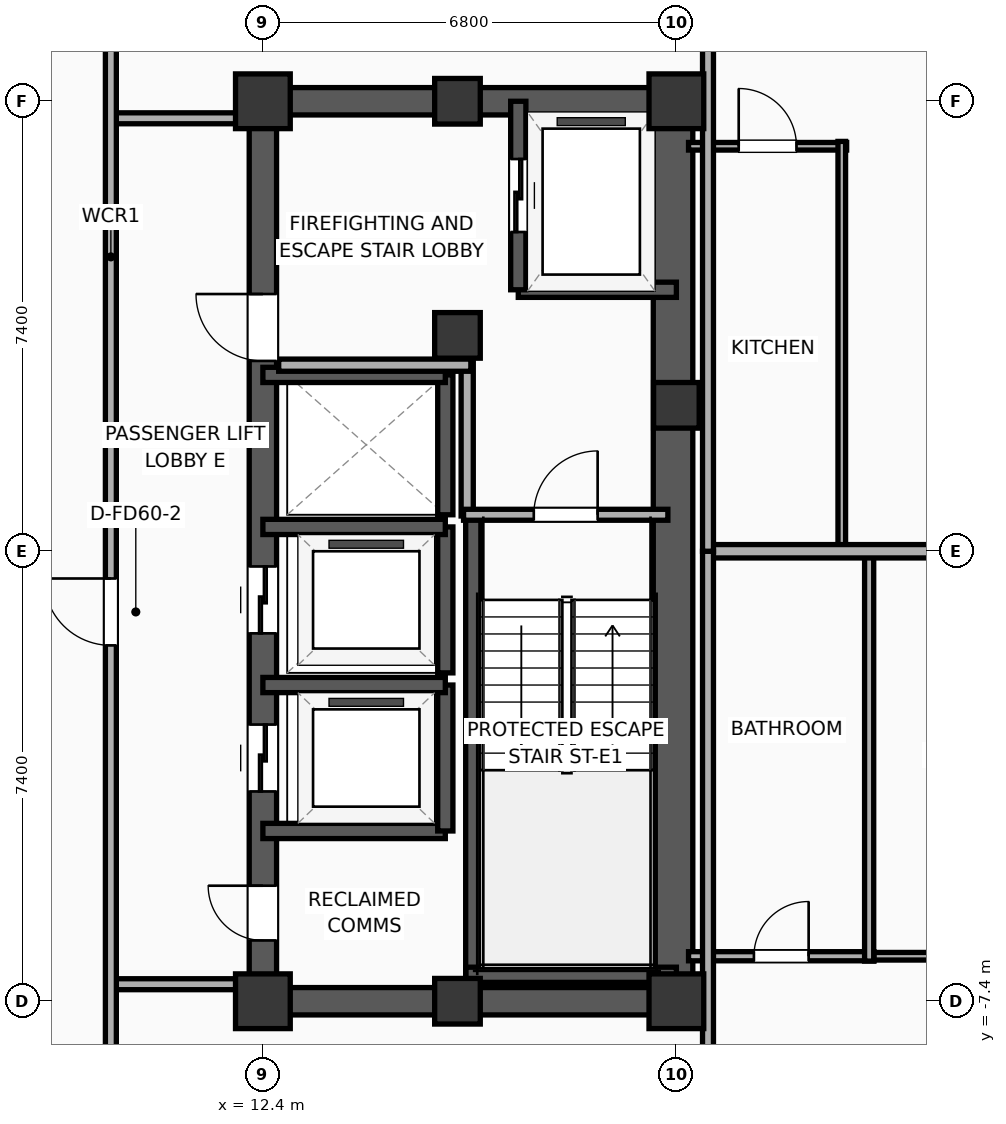
"""IFC4 building model, lengths in metres.
Left out: names, types, materials, properties, quantities, classifications, styles, units other than length and angle.
Written with IfcOpenShell. Run it as: python <this file> out.ifc"""

import sys

from ifc_helpers import new_model, si_unit, direction, frame, frame_2d, origin, origin_2d, place, context, subcontext, project, spatial, rectangle, extrude, element, fill, save


model = new_model("IFC4")
c1 = context("Model", 3, precision=1e-05, world=origin(), true_north=direction((0.0, 1.0)))
c2 = subcontext(c1, "Body", "Model", "MODEL_VIEW")
j1 = project(units=[si_unit("LENGTHUNIT", "METRE"), si_unit("PLANEANGLEUNIT", "RADIAN")], contexts=[c1])
p1 = place(None, origin())
s1 = spatial("IfcSite", under=j1, at=p1, CompositionType="ELEMENT")
p2 = place(p1, origin())
s2 = spatial("IfcBuilding", under=s1, at=p2, CompositionType="ELEMENT")
p3 = place(p2, frame((0.0, 0.0, 152.1)))
s3 = spatial("IfcBuildingStorey", under=s2, at=p3, CompositionType="ELEMENT", Elevation=152.1)
p4 = place(p3, frame((12.4, -7.4, 0.0), z_axis=(0.0, 0.0, 1.0), x_axis=(1.0, 0.0, 0.0)))
e1 = element("IfcColumn", 1, at=p4, inside=s3, PredefinedType="COLUMN", context=c2, shape_type="SweptSolid", body=[
    extrude(rectangle(XDim=0.9, YDim=0.9, at=origin_2d()), origin(), (0.0, 0.0, 1.0), 3.9),
])
p5 = place(p3, frame((15.6, 3.55, 0.0), z_axis=(0.0, 0.0, 1.0), x_axis=(1.0, 0.0, 0.0)))
e2 = element("IfcColumn", 2, at=p5, inside=s3, PredefinedType="COLUMN", context=c2, shape_type="SweptSolid", body=[
    extrude(rectangle(XDim=0.75, YDim=0.75, at=origin_2d()), origin(), (0.0, 0.0, 1.0), 3.9),
])
p6 = place(p3, frame((12.4, 7.4, 0.0), z_axis=(0.0, 0.0, 1.0), x_axis=(1.0, 0.0, 0.0)))
e3 = element("IfcColumn", 3, at=p6, inside=s3, PredefinedType="COLUMN", context=c2, shape_type="SweptSolid", body=[
    extrude(rectangle(XDim=0.9, YDim=0.9, at=origin_2d()), origin(), (0.0, 0.0, 1.0), 3.9),
])
for number, where, z_axis, x_axis in (
    (4, (15.6, -7.4, 0.0), (0.0, 0.0, 1.0), (1.0, 0.0, 0.0)),
    (5, (15.6, 7.4, 0.0), (0.0, 0.0, 1.0), (1.0, 0.0, 0.0)),
):
    element("IfcColumn", number, at=place(p3, frame(where, z_axis=z_axis, x_axis=x_axis)), inside=s3, PredefinedType="COLUMN", context=c2, shape_type="SweptSolid", body=[
        extrude(rectangle(XDim=0.75, YDim=0.75, at=origin_2d()), origin(), (0.0, 0.0, 1.0), 3.9),
    ])
p7 = place(p3, frame((19.2, -7.4, 0.0), z_axis=(0.0, 0.0, 1.0), x_axis=(1.0, 0.0, 0.0)))
e6 = element("IfcColumn", 6, at=p7, inside=s3, PredefinedType="COLUMN", context=c2, shape_type="SweptSolid", body=[
    extrude(rectangle(XDim=0.9, YDim=0.9, at=origin_2d()), origin(), (0.0, 0.0, 1.0), 3.9),
])
p8 = place(p3, frame((19.2, 2.4, 0.0), z_axis=(0.0, 0.0, 1.0), x_axis=(1.0, 0.0, 0.0)))
e7 = element("IfcColumn", 7, at=p8, inside=s3, PredefinedType="COLUMN", context=c2, shape_type="SweptSolid", body=[
    extrude(rectangle(XDim=0.75, YDim=0.75, at=origin_2d()), origin(), (0.0, 0.0, 1.0), 3.9),
])
p9 = place(p3, frame((19.2, 7.4, 0.0), z_axis=(0.0, 0.0, 1.0), x_axis=(1.0, 0.0, 0.0)))
e8 = element("IfcColumn", 8, at=p9, inside=s3, PredefinedType="COLUMN", context=c2, shape_type="SweptSolid", body=[
    extrude(rectangle(XDim=0.9, YDim=0.9, at=origin_2d()), origin(), (0.0, 0.0, 1.0), 3.9),
])
for number, where, z_axis, x_axis in (
    (9, (12.175, -7.4, 0.0), (0.0, 0.0, 1.0), (1.0, 0.0, 0.0)),
    (10, (12.175, 7.4, 0.0), (0.0, 0.0, 1.0), (1.0, 0.0, 0.0)),
):
    element("IfcWall", number, at=place(p3, frame(where, z_axis=z_axis, x_axis=x_axis)), inside=s3, PredefinedType="SHEAR", context=c2, shape_type="SweptSolid", body=[
        extrude(rectangle(XDim=7.25, YDim=0.45, at=frame_2d((3.625, 0.0))), origin(), (0.0, 0.0, 1.0), 3.65),
    ])
p10 = place(p3, frame((12.4, -7.4, 0.0), z_axis=(0.0, 0.0, 1.0), x_axis=(0.0, 1.0, 0.0)))
e11 = element("IfcWall", 11, at=p10, inside=s3, PredefinedType="SHEAR", context=c2, shape_type="SweptSolid", body=[
    extrude(rectangle(XDim=14.8, YDim=0.45, at=frame_2d((7.4, 0.0))), origin(), (0.0, 0.0, 1.0), 3.65),
])
p11 = place(p10, frame((3.45, 0.0, 0.0)))
e12 = element("IfcOpeningElement", 12, at=p11, cuts=e11, PredefinedType="OPENING", context=c2, shape_type="SweptSolid", body=[
    extrude(rectangle(XDim=1.1, YDim=2.05, at=frame_2d((0.55, 1.025))), frame((0.0, 0.235, 0.0), z_axis=(0.0, -1.0, 0.0), x_axis=(1.0, 0.0, 0.0)), (0.0, 0.0, 1.0), 0.47),
])
p12 = place(p10, frame((6.05, 0.0, 0.0)))
e13 = element("IfcOpeningElement", 13, at=p12, cuts=e11, PredefinedType="OPENING", context=c2, shape_type="SweptSolid", body=[
    extrude(rectangle(XDim=1.1, YDim=2.05, at=frame_2d((0.55, 1.025))), frame((0.0, 0.235, 0.0), z_axis=(0.0, -1.0, 0.0), x_axis=(1.0, 0.0, 0.0)), (0.0, 0.0, 1.0), 0.47),
])
p13 = place(p10, frame((10.53, 0.0, 0.0)))
e14 = element("IfcOpeningElement", 14, at=p13, cuts=e11, PredefinedType="OPENING", context=c2, shape_type="SweptSolid", body=[
    extrude(rectangle(XDim=1.1, YDim=2.05, at=frame_2d((0.55, 1.025))), frame((0.0, 0.235, 0.0), z_axis=(0.0, -1.0, 0.0), x_axis=(1.0, 0.0, 0.0)), (0.0, 0.0, 1.0), 0.47),
])
p14 = place(p10, frame((1.0, 0.0, 0.0)))
e15 = element("IfcOpeningElement", 15, at=p14, cuts=e11, PredefinedType="OPENING", context=c2, shape_type="SweptSolid", body=[
    extrude(rectangle(XDim=0.9, YDim=2.05, at=frame_2d((0.45, 1.025))), frame((0.0, 0.235, 0.0), z_axis=(0.0, -1.0, 0.0), x_axis=(1.0, 0.0, 0.0)), (0.0, 0.0, 1.0), 0.47),
])
p15 = place(p3, frame((19.145, -7.4, 0.0), z_axis=(0.0, 0.0, 1.0), x_axis=(0.0, 1.0, 0.0)))
e16 = element("IfcWall", 16, at=p15, inside=s3, PredefinedType="SHEAR", context=c2, shape_type="SweptSolid", body=[
    extrude(rectangle(XDim=14.8, YDim=0.65, at=frame_2d((7.4, 0.0))), origin(), (0.0, 0.0, 1.0), 3.65),
])
p16 = place(p3, frame((15.86, -7.085, 0.0), z_axis=(0.0, 0.0, 1.0), x_axis=(0.0, 1.0, 0.0)))
e17 = element("IfcWall", 17, at=p16, inside=s3, PredefinedType="SOLIDWALL", context=c2, shape_type="SweptSolid", body=[
    extrude(rectangle(XDim=7.685, YDim=0.25, at=frame_2d((3.843, 0.0))), origin(), (0.0, 0.0, 1.0), 3.65),
])
p17 = place(p3, frame((15.74, -6.965, 0.0), z_axis=(0.0, 0.0, 1.0), x_axis=(1.0, 0.0, 0.0)))
e18 = element("IfcWall", 18, at=p17, inside=s3, PredefinedType="SOLIDWALL", context=c2, shape_type="SweptSolid", body=[
    extrude(rectangle(XDim=3.46, YDim=0.25, at=frame_2d((1.73, 0.0))), origin(), (0.0, 0.0, 1.0), 3.65),
])
p18 = place(p3, frame((16.6, 4.3, 0.0), z_axis=(0.0, 0.0, 1.0), x_axis=(1.0, 0.0, 0.0)))
e19 = element("IfcWall", 19, at=p18, inside=s3, PredefinedType="SOLIDWALL", context=c2, shape_type="SweptSolid", body=[
    extrude(rectangle(XDim=2.6, YDim=0.25, at=frame_2d((1.3, 0.0))), origin(), (0.0, 0.0, 1.0), 3.65),
])
p19 = place(p3, frame((16.6, 7.4, 0.0), z_axis=(0.0, 0.0, 1.0), x_axis=(0.0, -1.0, 0.0)))
e20 = element("IfcWall", 20, at=p19, inside=s3, PredefinedType="SOLIDWALL", context=c2, shape_type="SweptSolid", body=[
    extrude(rectangle(XDim=3.1, YDim=0.25, at=frame_2d((1.55, 0.0))), origin(), (0.0, 0.0, 1.0), 3.65),
])
p20 = place(p19, frame((0.95, 0.0, 0.0)))
e21 = element("IfcOpeningElement", 21, at=p20, cuts=e20, PredefinedType="OPENING", context=c2, shape_type="SweptSolid", body=[
    extrude(rectangle(XDim=1.2, YDim=2.05, at=frame_2d((0.6, 1.025))), frame((0.0, 0.135, 0.0), z_axis=(0.0, -1.0, 0.0), x_axis=(1.0, 0.0, 0.0)), (0.0, 0.0, 1.0), 0.27),
])
p21 = place(p3, frame((12.4, -4.6, 0.0), z_axis=(0.0, 0.0, 1.0), x_axis=(1.0, 0.0, 0.0)))
e22 = element("IfcWall", 22, at=p21, inside=s3, PredefinedType="SOLIDWALL", context=c2, shape_type="SweptSolid", body=[
    extrude(rectangle(XDim=3.0, YDim=0.25, at=frame_2d((1.5, 0.0))), origin(), (0.0, 0.0, 1.0), 3.65),
])
p22 = place(p3, frame((15.4, -4.6, 0.0), z_axis=(0.0, 0.0, 1.0), x_axis=(0.0, 1.0, 0.0)))
e23 = element("IfcWall", 23, at=p22, inside=s3, PredefinedType="SOLIDWALL", context=c2, shape_type="SweptSolid", body=[
    extrude(rectangle(XDim=2.4, YDim=0.25, at=frame_2d((1.2, 0.0))), origin(), (0.0, 0.0, 1.0), 3.65),
])
p23 = place(p3, frame((15.4, -2.2, 0.0), z_axis=(0.0, 0.0, 1.0), x_axis=(-1.0, 0.0, 0.0)))
e24 = element("IfcWall", 24, at=p23, inside=s3, PredefinedType="SOLIDWALL", context=c2, shape_type="SweptSolid", body=[
    extrude(rectangle(XDim=3.0, YDim=0.25, at=frame_2d((1.5, 0.0))), origin(), (0.0, 0.0, 1.0), 3.65),
])
p24 = place(p3, frame((15.4, -2.0, 0.0), z_axis=(0.0, 0.0, 1.0), x_axis=(0.0, 1.0, 0.0)))
e25 = element("IfcWall", 25, at=p24, inside=s3, PredefinedType="SOLIDWALL", context=c2, shape_type="SweptSolid", body=[
    extrude(rectangle(XDim=2.4, YDim=0.25, at=frame_2d((1.2, 0.0))), origin(), (0.0, 0.0, 1.0), 3.65),
])
p25 = place(p3, frame((15.4, 0.4, 0.0), z_axis=(0.0, 0.0, 1.0), x_axis=(-1.0, 0.0, 0.0)))
e26 = element("IfcWall", 26, at=p25, inside=s3, PredefinedType="SOLIDWALL", context=c2, shape_type="SweptSolid", body=[
    extrude(rectangle(XDim=3.0, YDim=0.25, at=frame_2d((1.5, 0.0))), origin(), (0.0, 0.0, 1.0), 3.65),
])
p26 = place(p3, frame((15.4, 0.6, 0.0), z_axis=(0.0, 0.0, 1.0), x_axis=(0.0, 1.0, 0.0)))
e27 = element("IfcWall", 27, at=p26, inside=s3, PredefinedType="SOLIDWALL", context=c2, shape_type="SweptSolid", body=[
    extrude(rectangle(XDim=2.3, YDim=0.25, at=frame_2d((1.15, 0.0))), origin(), (0.0, 0.0, 1.0), 3.65),
])
p27 = place(p3, frame((15.4, 2.9, 0.0), z_axis=(0.0, 0.0, 1.0), x_axis=(-1.0, 0.0, 0.0)))
e28 = element("IfcWall", 28, at=p27, inside=s3, PredefinedType="SOLIDWALL", context=c2, shape_type="SweptSolid", body=[
    extrude(rectangle(XDim=3.0, YDim=0.25, at=frame_2d((1.5, 0.0))), origin(), (0.0, 0.0, 1.0), 3.65),
])
p28 = place(p3, frame((15.76, 0.58, 0.0), z_axis=(0.0, 0.0, 1.0), x_axis=(0.0, 1.0, 0.0)))
e29 = element("IfcWall", 29, at=p28, inside=s3, PredefinedType="PARTITIONING", context=c2, shape_type="SweptSolid", body=[
    extrude(rectangle(XDim=2.52, YDim=0.2, at=frame_2d((1.26, 0.0))), origin(), (0.0, 0.0, 1.0), 3.65),
])
p29 = place(p3, frame((12.66, 3.06, 0.0), z_axis=(0.0, 0.0, 1.0), x_axis=(1.0, 0.0, 0.0)))
e30 = element("IfcWall", 30, at=p29, inside=s3, PredefinedType="PARTITIONING", context=c2, shape_type="SweptSolid", body=[
    extrude(rectangle(XDim=3.16, YDim=0.2, at=frame_2d((1.58, 0.0))), origin(), (0.0, 0.0, 1.0), 3.65),
])
p30 = place(p3, frame((15.7, 0.6, 0.0), z_axis=(0.0, 0.0, 1.0), x_axis=(1.0, 0.0, 0.0)))
e31 = element("IfcWall", 31, at=p30, inside=s3, PredefinedType="PARTITIONING", context=c2, shape_type="SweptSolid", body=[
    extrude(rectangle(XDim=3.36, YDim=0.18, at=frame_2d((1.68, 0.0))), origin(), (0.0, 0.0, 1.0), 3.65),
])
p31 = place(p30, frame((1.155, 0.0, 0.0)))
e32 = element("IfcOpeningElement", 32, at=p31, cuts=e31, PredefinedType="OPENING", context=c2, shape_type="SweptSolid", body=[
    extrude(rectangle(XDim=1.05, YDim=2.05, at=frame_2d((0.525, 1.025))), frame((0.0, 0.1, 0.0), z_axis=(0.0, -1.0, 0.0), x_axis=(1.0, 0.0, 0.0)), (0.0, 0.0, 1.0), 0.2),
])
for number, where, z_axis, x_axis in (
    (33, (9.88, 7.12, 0.0), (0.0, 0.0, 1.0), (1.0, 0.0, 0.0)),
    (34, (9.88, -7.12, 0.0), (0.0, 0.0, 1.0), (1.0, 0.0, 0.0)),
):
    element("IfcWall", number, at=place(p3, frame(where, z_axis=z_axis, x_axis=x_axis)), inside=s3, PredefinedType="PARTITIONING", context=c2, shape_type="SweptSolid", body=[
        extrude(rectangle(XDim=2.27, YDim=0.18, at=frame_2d((1.135, 0.0))), origin(), (0.0, 0.0, 1.0), 3.65),
    ])
p32 = place(p3, frame((9.9, -9.98, 0.0), z_axis=(0.0, 0.0, 1.0), x_axis=(0.0, 1.0, 0.0)))
e35 = element("IfcWall", 35, at=p32, inside=s3, PredefinedType="PARTITIONING", context=c2, shape_type="SweptSolid", body=[
    extrude(rectangle(XDim=19.96, YDim=0.18, at=frame_2d((9.98, 0.0))), origin(), (0.0, 0.0, 1.0), 3.65),
])
p33 = place(p32, frame((8.432, 0.0, 0.0)))
e36 = element("IfcOpeningElement", 36, at=p33, cuts=e35, PredefinedType="OPENING", context=c2, shape_type="SweptSolid", body=[
    extrude(rectangle(XDim=1.1, YDim=2.05, at=frame_2d((0.55, 1.025))), frame((0.0, 0.1, 0.0), z_axis=(0.0, -1.0, 0.0), x_axis=(1.0, 0.0, 0.0)), (0.0, 0.0, 1.0), 0.2),
])
p34 = place(p3, frame((22.31, -6.66, 0.0), z_axis=(0.0, 0.0, 1.0), x_axis=(1.0, 0.0, 0.0)))
e37 = element("IfcWall", 37, at=p34, inside=s3, PredefinedType="PARTITIONING", context=c2, shape_type="SweptSolid", body=[
    extrude(rectangle(XDim=5.071, YDim=0.125, at=frame_2d((2.536, 0.0))), origin(), (0.0, 0.0, 1.0), 3.65),
])
p35 = place(p34, frame((1.832, 0.0, 0.0)))
e38 = element("IfcOpeningElement", 38, at=p35, cuts=e37, PredefinedType="OPENING", context=c2, shape_type="SweptSolid", body=[
    extrude(rectangle(XDim=0.9, YDim=2.05, at=frame_2d((0.45, 1.025))), frame((0.0, 0.073, 0.0), z_axis=(0.0, -1.0, 0.0), x_axis=(1.0, 0.0, 0.0)), (0.0, 0.0, 1.0), 0.145),
])
p36 = place(p3, frame((19.4, -6.66, 0.0), z_axis=(0.0, 0.0, 1.0), x_axis=(1.0, 0.0, 0.0)))
e39 = element("IfcWall", 39, at=p36, inside=s3, PredefinedType="PLUMBINGWALL", context=c2, shape_type="SweptSolid", body=[
    extrude(rectangle(XDim=3.05, YDim=0.15, at=frame_2d((1.525, 0.0))), origin(), (0.0, 0.0, 1.0), 3.04),
])
p37 = place(p36, frame((1.075, 0.0, 0.0)))
e40 = element("IfcOpeningElement", 40, at=p37, cuts=e39, PredefinedType="OPENING", context=c2, shape_type="SweptSolid", body=[
    extrude(rectangle(XDim=0.9, YDim=2.05, at=frame_2d((0.45, 1.025))), frame((0.0, 0.085, 0.0), z_axis=(0.0, -1.0, 0.0), x_axis=(1.0, 0.0, 0.0)), (0.0, 0.0, 1.0), 0.17),
])
p38 = place(p3, frame((22.37, -6.74, 0.0), z_axis=(0.0, 0.0, 1.0), x_axis=(0.0, 1.0, 0.0)))
e41 = element("IfcWall", 41, at=p38, inside=s3, PredefinedType="PLUMBINGWALL", context=c2, shape_type="SweptSolid", body=[
    extrude(rectangle(XDim=6.72, YDim=0.15, at=frame_2d((3.36, 0.0))), origin(), (0.0, 0.0, 1.0), 3.65),
])
p39 = place(p3, frame((19.4, 6.66, 0.0), z_axis=(0.0, 0.0, 1.0), x_axis=(1.0, 0.0, 0.0)))
e42 = element("IfcWall", 42, at=p39, inside=s3, PredefinedType="PARTITIONING", context=c2, shape_type="SweptSolid", body=[
    extrude(rectangle(XDim=2.6, YDim=0.125, at=frame_2d((1.3, 0.0))), origin(), (0.0, 0.0, 1.0), 3.65),
])
p40 = place(p39, frame((0.825, 0.0, 0.0)))
e43 = element("IfcOpeningElement", 43, at=p40, cuts=e42, PredefinedType="OPENING", context=c2, shape_type="SweptSolid", body=[
    extrude(rectangle(XDim=0.95, YDim=2.05, at=frame_2d((0.475, 1.025))), frame((0.0, 0.073, 0.0), z_axis=(0.0, -1.0, 0.0), x_axis=(1.0, 0.0, 0.0)), (0.0, 0.0, 1.0), 0.145),
])
p41 = place(p3, frame((21.92, 0.02, 0.0), z_axis=(0.0, 0.0, 1.0), x_axis=(0.0, 1.0, 0.0)))
e44 = element("IfcWall", 44, at=p41, inside=s3, PredefinedType="PARTITIONING", context=c2, shape_type="SweptSolid", body=[
    extrude(rectangle(XDim=6.72, YDim=0.125, at=frame_2d((3.36, 0.0))), origin(), (0.0, 0.0, 1.0), 3.65),
])
p42 = place(p3, frame((19.72, 0.0, 0.0), z_axis=(0.0, 0.0, 1.0), x_axis=(1.0, 0.0, 0.0)))
e45 = element("IfcWall", 45, at=p42, inside=s3, PredefinedType="PARTITIONING", context=c2, shape_type="SweptSolid", body=[
    extrude(rectangle(XDim=6.81, YDim=0.22, at=frame_2d((3.405, 0.0))), origin(), (0.0, 0.0, 1.0), 3.65),
])
p43 = place(p3, frame((19.72, -18.532, 0.0), z_axis=(0.0, 0.0, 1.0), x_axis=(0.0, 1.0, 0.0)))
e46 = element("IfcWall", 46, at=p43, inside=s3, PredefinedType="PARTITIONING", context=c2, shape_type="SweptSolid", body=[
    extrude(rectangle(XDim=18.532, YDim=0.18, at=frame_2d((9.266, 0.0))), origin(), (0.0, 0.0, 1.0), 3.65),
])
p44 = place(p43, frame((7.452, 0.0, 0.0)))
e47 = element("IfcOpeningElement", 47, at=p44, cuts=e46, PredefinedType="OPENING", context=c2, shape_type="SweptSolid", body=[
    extrude(rectangle(XDim=0.9, YDim=2.05, at=frame_2d((0.45, 1.025))), frame((0.0, 0.1, 0.0), z_axis=(0.0, -1.0, 0.0), x_axis=(1.0, 0.0, 0.0)), (0.0, 0.0, 1.0), 0.2),
])
p45 = place(p3, frame((19.72, 0.0, 0.0), z_axis=(0.0, 0.0, 1.0), x_axis=(0.0, 1.0, 0.0)))
e48 = element("IfcWall", 48, at=p45, inside=s3, PredefinedType="PARTITIONING", context=c2, shape_type="SweptSolid", body=[
    extrude(rectangle(XDim=22.15, YDim=0.18, at=frame_2d((11.075, 0.0))), origin(), (0.0, 0.0, 1.0), 3.04),
])
p46 = place(p45, frame((10.18, 0.0, 0.0)))
e49 = element("IfcOpeningElement", 49, at=p46, cuts=e48, PredefinedType="OPENING", context=c2, shape_type="SweptSolid", body=[
    extrude(rectangle(XDim=0.9, YDim=2.05, at=frame_2d((0.45, 1.025))), frame((0.0, 0.1, 0.0), z_axis=(0.0, -1.0, 0.0), x_axis=(1.0, 0.0, 0.0)), (0.0, 0.0, 1.0), 0.2),
])
p47 = place(p20, origin())
e50 = element("IfcDoor", 50, at=p47, inside=s3, OperationType="SLIDING_TO_LEFT", PredefinedType="DOOR", context=c2, shape_type="SweptSolid", body=[
    extrude(rectangle(XDim=1.2, YDim=2.05, at=frame_2d((0.6, 1.025))), frame((0.0, 0.025, 0.0), z_axis=(0.0, -1.0, 0.0), x_axis=(1.0, 0.0, 0.0)), (0.0, 0.0, 1.0), 0.05),
])
fill(e21, e50)
p48 = place(p11, origin())
e51 = element("IfcDoor", 51, at=p48, inside=s3, OperationType="SLIDING_TO_LEFT", PredefinedType="DOOR", context=c2, shape_type="SweptSolid", body=[
    extrude(rectangle(XDim=1.1, YDim=2.05, at=frame_2d((0.55, 1.025))), frame((0.0, 0.025, 0.0), z_axis=(0.0, -1.0, 0.0), x_axis=(1.0, 0.0, 0.0)), (0.0, 0.0, 1.0), 0.05),
])
fill(e12, e51)
p49 = place(p12, origin())
e52 = element("IfcDoor", 52, at=p49, inside=s3, OperationType="SLIDING_TO_LEFT", PredefinedType="DOOR", context=c2, shape_type="SweptSolid", body=[
    extrude(rectangle(XDim=1.1, YDim=2.05, at=frame_2d((0.55, 1.025))), frame((0.0, 0.025, 0.0), z_axis=(0.0, -1.0, 0.0), x_axis=(1.0, 0.0, 0.0)), (0.0, 0.0, 1.0), 0.05),
])
fill(e13, e52)
p50 = place(p31, origin())
e53 = element("IfcDoor", 53, at=p50, inside=s3, OperationType="SINGLE_SWING_RIGHT", PredefinedType="DOOR", context=c2, shape_type="SweptSolid", body=[
    extrude(rectangle(XDim=1.05, YDim=2.05, at=frame_2d((0.525, 1.025))), frame((0.0, 0.025, 0.0), z_axis=(0.0, -1.0, 0.0), x_axis=(1.0, 0.0, 0.0)), (0.0, 0.0, 1.0), 0.05),
])
fill(e32, e53)
p51 = place(p33, origin())
e54 = element("IfcDoor", 54, at=p51, inside=s3, OperationType="SINGLE_SWING_RIGHT", PredefinedType="DOOR", context=c2, shape_type="SweptSolid", body=[
    extrude(rectangle(XDim=1.1, YDim=2.05, at=frame_2d((0.55, 1.025))), frame((0.0, 0.025, 0.0), z_axis=(0.0, -1.0, 0.0), x_axis=(1.0, 0.0, 0.0)), (0.0, 0.0, 1.0), 0.05),
])
fill(e36, e54)
p52 = place(p37, origin())
e55 = element("IfcDoor", 55, at=p52, inside=s3, OperationType="SINGLE_SWING_RIGHT", PredefinedType="DOOR", context=c2, shape_type="SweptSolid", body=[
    extrude(rectangle(XDim=0.9, YDim=2.05, at=frame_2d((0.45, 1.025))), frame((0.0, 0.025, 0.0), z_axis=(0.0, -1.0, 0.0), x_axis=(1.0, 0.0, 0.0)), (0.0, 0.0, 1.0), 0.05),
])
fill(e40, e55)
p53 = place(p40, origin())
e56 = element("IfcDoor", 56, at=p53, inside=s3, OperationType="SINGLE_SWING_LEFT", PredefinedType="DOOR", context=c2, shape_type="SweptSolid", body=[
    extrude(rectangle(XDim=0.95, YDim=2.05, at=frame_2d((0.475, 1.025))), frame((0.0, 0.025, 0.0), z_axis=(0.0, -1.0, 0.0), x_axis=(1.0, 0.0, 0.0)), (0.0, 0.0, 1.0), 0.05),
])
fill(e43, e56)
p54 = place(p13, origin())
e57 = element("IfcDoor", 57, at=p54, inside=s3, OperationType="SINGLE_SWING_RIGHT", PredefinedType="DOOR", context=c2, shape_type="SweptSolid", body=[
    extrude(rectangle(XDim=1.1, YDim=2.05, at=frame_2d((0.55, 1.025))), frame((0.0, 0.025, 0.0), z_axis=(0.0, -1.0, 0.0), x_axis=(1.0, 0.0, 0.0)), (0.0, 0.0, 1.0), 0.05),
])
fill(e14, e57)
p55 = place(p14, origin())
e58 = element("IfcDoor", 58, at=p55, inside=s3, OperationType="SINGLE_SWING_RIGHT", PredefinedType="DOOR", context=c2, shape_type="SweptSolid", body=[
    extrude(rectangle(XDim=0.9, YDim=2.05, at=frame_2d((0.45, 1.025))), frame((0.0, 0.025, 0.0), z_axis=(0.0, -1.0, 0.0), x_axis=(1.0, 0.0, 0.0)), (0.0, 0.0, 1.0), 0.05),
])
fill(e15, e58)
save(model, sys.argv[1])
